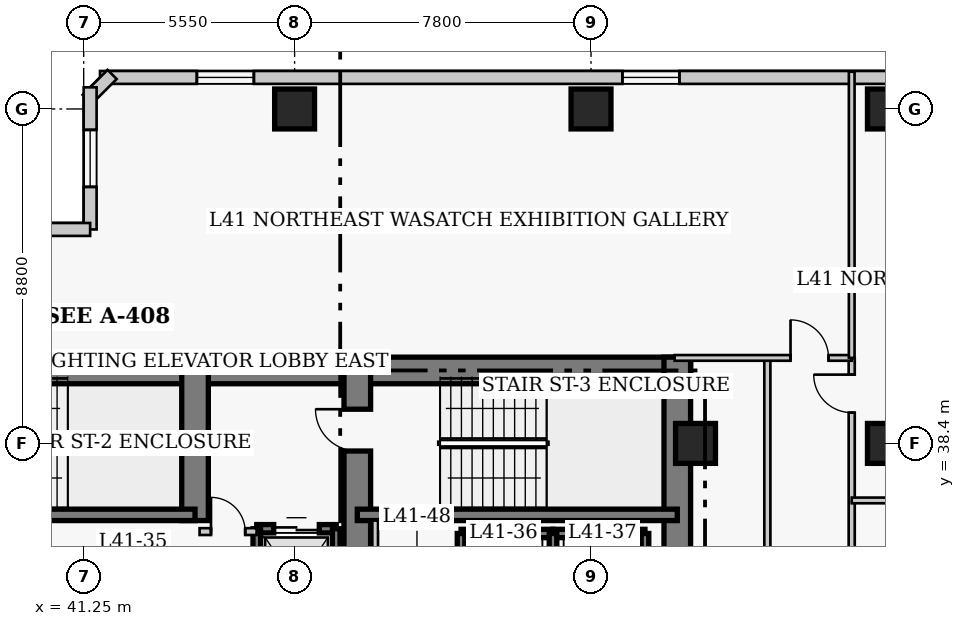
"""IFC4 building model, lengths in metres.
Left out: names, types, materials, properties, quantities, classifications, styles, units other than length and angle.
Written with IfcOpenShell. Run it as: python <this file> out.ifc"""

import sys

from ifc_helpers import new_model, si_unit, direction, frame, frame_2d, origin, origin_2d, place, context, subcontext, project, spatial, rectangle, extrude, element, fill, save


model = new_model("IFC4")
c1 = context("Model", 3, precision=1e-05, world=origin(), true_north=direction((0.0, 1.0)))
c2 = subcontext(c1, "Body", "Model", "MODEL_VIEW")
j1 = project(units=[si_unit("LENGTHUNIT", "METRE"), si_unit("PLANEANGLEUNIT", "RADIAN")], contexts=[c1])
p1 = place(None, origin())
s1 = spatial("IfcSite", under=j1, at=p1, CompositionType="ELEMENT")
p2 = place(p1, origin())
s2 = spatial("IfcBuilding", under=s1, at=p2, CompositionType="ELEMENT")
p3 = place(p2, frame((0.0, 0.0, 165.0)))
s3 = spatial("IfcBuildingStorey", under=s2, at=p3, CompositionType="ELEMENT", Elevation=165.0)
p4 = place(p3, frame((35.85, 40.32, 0.0), z_axis=(0.0, 0.0, 1.0), x_axis=(1.0, 0.0, 0.0)))
e1 = element("IfcWall", 1, at=p4, inside=s3, PredefinedType="SHEAR", context=c2, shape_type="SweptSolid", body=[
    extrude(rectangle(XDim=12.6, YDim=0.7, at=frame_2d((6.3, 0.0))), origin(), (0.0, 0.0, 1.0), 3.8),
])
p5 = place(p3, frame((48.45, 40.32, 0.0), z_axis=(0.0, 0.0, 1.0), x_axis=(1.0, 0.0, 0.0)))
e2 = element("IfcWall", 2, at=p5, inside=s3, PredefinedType="SHEAR", context=c2, shape_type="SweptSolid", body=[
    extrude(rectangle(XDim=8.77, YDim=0.7, at=frame_2d((4.385, 0.0))), origin(), (0.0, 0.0, 1.0), 3.8),
])
p6 = place(p3, frame((56.87, 27.05, 0.0), z_axis=(0.0, 0.0, 1.0), x_axis=(0.0, 1.0, 0.0)))
e3 = element("IfcWall", 3, at=p6, inside=s3, PredefinedType="SHEAR", context=c2, shape_type="SweptSolid", body=[
    extrude(rectangle(XDim=13.62, YDim=0.7, at=frame_2d((6.81, 0.0))), origin(), (0.0, 0.0, 1.0), 3.8),
])
p7 = place(p3, frame((44.18, 36.37, 0.0), z_axis=(0.0, 0.0, 1.0), x_axis=(0.0, 1.0, 0.0)))
e4 = element("IfcWall", 4, at=p7, inside=s3, PredefinedType="SHEAR", context=c2, shape_type="SweptSolid", body=[
    extrude(rectangle(XDim=3.95, YDim=0.7, at=frame_2d((1.975, 0.0))), origin(), (0.0, 0.0, 1.0), 3.8),
])
p8 = place(p3, frame((48.45, 32.4, 0.0), z_axis=(0.0, 0.0, 1.0), x_axis=(0.0, 1.0, 0.0)))
e5 = element("IfcWall", 5, at=p8, inside=s3, PredefinedType="SHEAR", context=c2, shape_type="SweptSolid", body=[
    extrude(rectangle(XDim=7.92, YDim=0.7, at=frame_2d((3.96, 0.0))), origin(), (0.0, 0.0, 1.0), 3.8),
])
p9 = place(p8, frame((5.8, 0.0, 0.0)))
e6 = element("IfcOpeningElement", 6, at=p9, cuts=e5, PredefinedType="OPENING", context=c2, shape_type="SweptSolid", body=[
    extrude(rectangle(XDim=1.1, YDim=2.15, at=frame_2d((0.55, 1.075))), frame((0.0, 0.36, 0.0), z_axis=(0.0, -1.0, 0.0), x_axis=(1.0, 0.0, 0.0)), (0.0, 0.0, 1.0), 0.72),
])
p10 = place(p3, frame((35.85, 36.52, 0.0), z_axis=(0.0, 0.0, 1.0), x_axis=(1.0, 0.0, 0.0)))
e7 = element("IfcWall", 7, at=p10, inside=s3, PredefinedType="SHEAR", context=c2, shape_type="SweptSolid", body=[
    extrude(rectangle(XDim=8.33, YDim=0.3, at=frame_2d((4.165, 0.0))), origin(), (0.0, 0.0, 1.0), 3.8),
])
p11 = place(p3, frame((48.45, 36.52, 0.0), z_axis=(0.0, 0.0, 1.0), x_axis=(1.0, 0.0, 0.0)))
e8 = element("IfcWall", 8, at=p11, inside=s3, PredefinedType="SHEAR", context=c2, shape_type="SweptSolid", body=[
    extrude(rectangle(XDim=8.42, YDim=0.3, at=frame_2d((4.21, 0.0))), origin(), (0.0, 0.0, 1.0), 3.8),
])
for number, where, z_axis, x_axis in (
    (9, (46.8, 47.2, 0.0), (0.0, 0.0, 1.0), (1.0, 0.0, 0.0)),
    (10, (54.6, 47.2, 0.0), (0.0, 0.0, 1.0), (1.0, 0.0, 0.0)),
    (11, (62.4, 38.4, 0.0), (0.0, 0.0, 1.0), (1.0, 0.0, 0.0)),
    (12, (62.4, 47.2, 0.0), (0.0, 0.0, 1.0), (1.0, 0.0, 0.0)),
    (13, (57.35, 38.4, 0.0), (0.0, 0.0, 1.0), (1.0, 0.0, 0.0)),
):
    element("IfcColumn", number, at=place(p3, frame(where, z_axis=z_axis, x_axis=x_axis)), inside=s3, PredefinedType="COLUMN", context=c2, shape_type="SweptSolid", body=[
        extrude(rectangle(XDim=1.05, YDim=1.05, at=origin_2d()), origin(), (0.0, 0.0, 1.0), 3.8),
    ])
p12 = place(p3, frame((68.37, 48.03, 0.0), z_axis=(0.0, 0.0, 1.0), x_axis=(-1.0, 0.0, 0.0)))
e14 = element("IfcWall", 14, at=p12, inside=s3, PredefinedType="SOLIDWALL", context=c2, shape_type="SweptSolid", body=[
    extrude(rectangle(XDim=26.69, YDim=0.34, at=frame_2d((13.345, 0.0))), origin(), (0.0, 0.0, 1.0), 3.55),
])
p13 = place(p12, frame((3.048, 0.0, 0.85)))
e15 = element("IfcOpeningElement", 15, at=p13, cuts=e14, PredefinedType="OPENING", context=c2, shape_type="SweptSolid", body=[
    extrude(rectangle(XDim=1.5, YDim=1.75, at=frame_2d((0.75, 0.875))), frame((0.0, 0.18, 0.0), z_axis=(0.0, -1.0, 0.0), x_axis=(1.0, 0.0, 0.0)), (0.0, 0.0, 1.0), 0.36),
])
p14 = place(p12, frame((11.445, 0.0, 0.85)))
e16 = element("IfcOpeningElement", 16, at=p14, cuts=e14, PredefinedType="OPENING", context=c2, shape_type="SweptSolid", body=[
    extrude(rectangle(XDim=1.5, YDim=1.75, at=frame_2d((0.75, 0.875))), frame((0.0, 0.18, 0.0), z_axis=(0.0, -1.0, 0.0), x_axis=(1.0, 0.0, 0.0)), (0.0, 0.0, 1.0), 0.36),
])
p15 = place(p12, frame((22.642, 0.0, 0.85)))
e17 = element("IfcOpeningElement", 17, at=p15, cuts=e14, PredefinedType="OPENING", context=c2, shape_type="SweptSolid", body=[
    extrude(rectangle(XDim=1.5, YDim=1.75, at=frame_2d((0.75, 0.875))), frame((0.0, 0.18, 0.0), z_axis=(0.0, -1.0, 0.0), x_axis=(1.0, 0.0, 0.0)), (0.0, 0.0, 1.0), 0.36),
])
p16 = place(p3, frame((41.999, 48.108, 0.0), z_axis=(0.0, 0.0, 1.0), x_axis=(-0.707106781187, -0.707106781187, 0.0)))
e18 = element("IfcWall", 18, at=p16, inside=s3, PredefinedType="SOLIDWALL", context=c2, shape_type="SweptSolid", body=[
    extrude(rectangle(XDim=0.929, YDim=0.34, at=frame_2d((0.464, 0.0))), origin(), (0.0, 0.0, 1.0), 3.55),
])
p17 = place(p3, frame((41.42, 47.77, 0.0), z_axis=(0.0, 0.0, 1.0), x_axis=(0.0, -1.0, 0.0)))
e19 = element("IfcWall", 19, at=p17, inside=s3, PredefinedType="SOLIDWALL", context=c2, shape_type="SweptSolid", body=[
    extrude(rectangle(XDim=3.74, YDim=0.34, at=frame_2d((1.87, 0.0))), origin(), (0.0, 0.0, 1.0), 3.55),
])
p18 = place(p17, frame((1.12, 0.0, 0.85)))
e20 = element("IfcOpeningElement", 20, at=p18, cuts=e19, PredefinedType="OPENING", context=c2, shape_type="SweptSolid", body=[
    extrude(rectangle(XDim=1.5, YDim=1.75, at=frame_2d((0.75, 0.875))), frame((0.0, 0.18, 0.0), z_axis=(0.0, -1.0, 0.0), x_axis=(1.0, 0.0, 0.0)), (0.0, 0.0, 1.0), 0.36),
])
p19 = place(p3, frame((41.42, 44.03, 0.0), z_axis=(0.0, 0.0, 1.0), x_axis=(-1.0, 0.0, 0.0)))
e21 = element("IfcWall", 21, at=p19, inside=s3, PredefinedType="SOLIDWALL", context=c2, shape_type="SweptSolid", body=[
    extrude(rectangle(XDim=4.84, YDim=0.34, at=frame_2d((2.42, 0.0))), origin(), (0.0, 0.0, 1.0), 3.55),
])
p20 = place(p19, frame((1.67, 0.0, 0.85)))
e22 = element("IfcOpeningElement", 22, at=p20, cuts=e21, PredefinedType="OPENING", context=c2, shape_type="SweptSolid", body=[
    extrude(rectangle(XDim=1.5, YDim=1.75, at=frame_2d((0.75, 0.875))), frame((0.0, 0.18, 0.0), z_axis=(0.0, -1.0, 0.0), x_axis=(1.0, 0.0, 0.0)), (0.0, 0.0, 1.0), 0.36),
])
p21 = place(p3, frame((51.18, 36.03, 0.0), z_axis=(0.0, 0.0, 1.0), x_axis=(1.0, 0.0, 0.0)))
e23 = element("IfcWall", 23, at=p21, inside=s3, PredefinedType="SHEAR", context=c2, shape_type="SweptSolid", body=[
    extrude(rectangle(XDim=2.42, YDim=0.22, at=frame_2d((1.21, 0.0))), origin(), (0.0, 0.0, 1.0), 3.8),
])
p22 = place(p3, frame((51.18, 33.17, 0.0), z_axis=(0.0, 0.0, 1.0), x_axis=(0.0, 1.0, 0.0)))
e24 = element("IfcWall", 24, at=p22, inside=s3, PredefinedType="SHEAR", context=c2, shape_type="SweptSolid", body=[
    extrude(rectangle(XDim=2.86, YDim=0.2, at=frame_2d((1.43, 0.0))), origin(), (0.0, 0.0, 1.0), 3.8),
])
p23 = place(p3, frame((53.6, 36.03, 0.0), z_axis=(0.0, 0.0, 1.0), x_axis=(1.0, 0.0, 0.0)))
e25 = element("IfcWall", 25, at=p23, inside=s3, PredefinedType="SHEAR", context=c2, shape_type="SweptSolid", body=[
    extrude(rectangle(XDim=2.42, YDim=0.22, at=frame_2d((1.21, 0.0))), origin(), (0.0, 0.0, 1.0), 3.8),
])
for number, where, z_axis, x_axis in (
    (26, (53.6, 33.17, 0.0), (0.0, 0.0, 1.0), (0.0, 1.0, 0.0)),
    (27, (56.02, 33.17, 0.0), (0.0, 0.0, 1.0), (0.0, 1.0, 0.0)),
):
    element("IfcWall", number, at=place(p3, frame(where, z_axis=z_axis, x_axis=x_axis)), inside=s3, PredefinedType="SHEAR", context=c2, shape_type="SweptSolid", body=[
        extrude(rectangle(XDim=2.86, YDim=0.2, at=frame_2d((1.43, 0.0))), origin(), (0.0, 0.0, 1.0), 3.8),
    ])
p24 = place(p3, frame((45.805, 36.155, 0.0), z_axis=(0.0, 0.0, 1.0), x_axis=(1.0, 0.0, 0.0)))
e28 = element("IfcWall", 28, at=p24, inside=s3, PredefinedType="SHEAR", context=c2, shape_type="SweptSolid", body=[
    extrude(rectangle(XDim=2.09, YDim=0.22, at=frame_2d((1.045, 0.0))), origin(), (0.0, 0.0, 1.0), 3.8),
])
p25 = place(p24, frame((0.445, 0.0, 0.0)))
e29 = element("IfcOpeningElement", 29, at=p25, cuts=e28, PredefinedType="OPENING", context=c2, shape_type="SweptSolid", body=[
    extrude(rectangle(XDim=1.2, YDim=2.15, at=frame_2d((0.6, 1.075))), frame((0.0, 0.12, 0.0), z_axis=(0.0, -1.0, 0.0), x_axis=(1.0, 0.0, 0.0)), (0.0, 0.0, 1.0), 0.24),
])
p26 = place(p3, frame((45.805, 32.65, 0.0), z_axis=(0.0, 0.0, 1.0), x_axis=(0.0, 1.0, 0.0)))
e30 = element("IfcWall", 30, at=p26, inside=s3, PredefinedType="SHEAR", context=c2, shape_type="SweptSolid", body=[
    extrude(rectangle(XDim=3.505, YDim=0.2, at=frame_2d((1.752, 0.0))), origin(), (0.0, 0.0, 1.0), 3.8),
])
p27 = place(p3, frame((47.895, 33.245, 0.0), z_axis=(0.0, 0.0, 1.0), x_axis=(0.0, 1.0, 0.0)))
e31 = element("IfcWall", 31, at=p27, inside=s3, PredefinedType="SHEAR", context=c2, shape_type="SweptSolid", body=[
    extrude(rectangle(XDim=2.91, YDim=0.2, at=frame_2d((1.455, 0.0))), origin(), (0.0, 0.0, 1.0), 3.8),
])
p28 = place(p3, frame((44.3, 36.08, 0.0), z_axis=(0.0, 0.0, 1.0), x_axis=(1.0, 0.0, 0.0)))
e32 = element("IfcWall", 32, at=p28, inside=s3, PredefinedType="PARTITIONING", context=c2, shape_type="SweptSolid", body=[
    extrude(rectangle(XDim=1.5, YDim=0.18, at=frame_2d((0.75, 0.0))), origin(), (0.0, 0.0, 1.0), 3.55),
])
p29 = place(p28, frame((0.3, 0.0, 0.0)))
e33 = element("IfcOpeningElement", 33, at=p29, cuts=e32, PredefinedType="OPENING", context=c2, shape_type="SweptSolid", body=[
    extrude(rectangle(XDim=0.9, YDim=2.15, at=frame_2d((0.45, 1.075))), frame((0.0, 0.1, 0.0), z_axis=(0.0, -1.0, 0.0), x_axis=(1.0, 0.0, 0.0)), (0.0, 0.0, 1.0), 0.2),
])
p30 = place(p3, frame((48.92, 32.75, 0.0), z_axis=(0.0, 0.0, 1.0), x_axis=(0.0, 1.0, 0.0)))
e34 = element("IfcWall", 34, at=p30, inside=s3, PredefinedType="PARTITIONING", context=c2, shape_type="SweptSolid", body=[
    extrude(rectangle(XDim=3.62, YDim=0.15, at=frame_2d((1.81, 0.0))), origin(), (0.0, 0.0, 1.0), 3.55),
])
p31 = place(p3, frame((61.46, 12.05, 0.0), z_axis=(0.0, 0.0, 1.0), x_axis=(0.0, 1.0, 0.0)))
e35 = element("IfcWall", 35, at=p31, inside=s3, PredefinedType="PARTITIONING", context=c2, shape_type="SweptSolid", body=[
    extrude(rectangle(XDim=28.6, YDim=0.16, at=frame_2d((14.3, 0.0))), origin(), (0.0, 0.0, 1.0), 3.55),
])
p32 = place(p31, frame((0.925, 0.0, 0.0)))
e36 = element("IfcOpeningElement", 36, at=p32, cuts=e35, PredefinedType="OPENING", context=c2, shape_type="SweptSolid", body=[
    extrude(rectangle(XDim=0.95, YDim=2.1, at=frame_2d((0.475, 1.05))), frame((0.0, 0.09, 0.0), z_axis=(0.0, -1.0, 0.0), x_axis=(1.0, 0.0, 0.0)), (0.0, 0.0, 1.0), 0.18),
])
p33 = place(p31, frame((20.325, 0.0, 0.0)))
e37 = element("IfcOpeningElement", 37, at=p33, cuts=e35, PredefinedType="OPENING", context=c2, shape_type="SweptSolid", body=[
    extrude(rectangle(XDim=0.95, YDim=2.1, at=frame_2d((0.475, 1.05))), frame((0.0, 0.09, 0.0), z_axis=(0.0, -1.0, 0.0), x_axis=(1.0, 0.0, 0.0)), (0.0, 0.0, 1.0), 0.18),
])
p34 = place(p31, frame((27.16, 0.0, 0.0)))
e38 = element("IfcOpeningElement", 38, at=p34, cuts=e35, PredefinedType="OPENING", context=c2, shape_type="SweptSolid", body=[
    extrude(rectangle(XDim=1.0, YDim=2.15, at=frame_2d((0.5, 1.075))), frame((0.0, 0.09, 0.0), z_axis=(0.0, -1.0, 0.0), x_axis=(1.0, 0.0, 0.0)), (0.0, 0.0, 1.0), 0.18),
])
p35 = place(p3, frame((59.24, 17.96, 0.0), z_axis=(0.0, 0.0, 1.0), x_axis=(0.0, 1.0, 0.0)))
e39 = element("IfcWall", 39, at=p35, inside=s3, PredefinedType="PARTITIONING", context=c2, shape_type="SweptSolid", body=[
    extrude(rectangle(XDim=22.69, YDim=0.16, at=frame_2d((11.345, 0.0))), origin(), (0.0, 0.0, 1.0), 3.55),
])
p36 = place(p3, frame((56.8, 40.65, 0.0), z_axis=(0.0, 0.0, 1.0), x_axis=(1.0, 0.0, 0.0)))
e40 = element("IfcWall", 40, at=p36, inside=s3, PredefinedType="PARTITIONING", context=c2, shape_type="SweptSolid", body=[
    extrude(rectangle(XDim=4.66, YDim=0.15, at=frame_2d((2.33, 0.0))), origin(), (0.0, 0.0, 1.0), 3.55),
])
p37 = place(p36, frame((3.05, 0.0, 0.0)))
e41 = element("IfcOpeningElement", 41, at=p37, cuts=e40, PredefinedType="OPENING", context=c2, shape_type="SweptSolid", body=[
    extrude(rectangle(XDim=1.0, YDim=2.15, at=frame_2d((0.5, 1.075))), frame((0.0, 0.085, 0.0), z_axis=(0.0, -1.0, 0.0), x_axis=(1.0, 0.0, 0.0)), (0.0, 0.0, 1.0), 0.17),
])
p38 = place(p3, frame((61.46, 40.65, 0.0), z_axis=(0.0, 0.0, 1.0), x_axis=(0.0, 1.0, 0.0)))
e42 = element("IfcWall", 42, at=p38, inside=s3, PredefinedType="PARTITIONING", context=c2, shape_type="SweptSolid", body=[
    extrude(rectangle(XDim=7.53, YDim=0.15, at=frame_2d((3.765, 0.0))), origin(), (0.0, 0.0, 1.0), 3.55),
])
p39 = place(p3, frame((61.46, 36.9, 0.0), z_axis=(0.0, 0.0, 1.0), x_axis=(1.0, 0.0, 0.0)))
e43 = element("IfcWall", 43, at=p39, inside=s3, PredefinedType="PARTITIONING", context=c2, shape_type="SweptSolid", body=[
    extrude(rectangle(XDim=3.64, YDim=0.15, at=frame_2d((1.82, 0.0))), origin(), (0.0, 0.0, 1.0), 3.55),
])
p40 = place(p14, origin())
e44 = element("IfcWindow", 44, at=p40, inside=s3, PartitioningType="SINGLE_PANEL", PredefinedType="WINDOW", context=c2, shape_type="SweptSolid", body=[
    extrude(rectangle(XDim=1.5, YDim=1.75, at=frame_2d((0.75, 0.875))), frame((0.0, 0.03, 0.0), z_axis=(0.0, -1.0, 0.0), x_axis=(1.0, 0.0, 0.0)), (0.0, 0.0, 1.0), 0.06),
])
fill(e16, e44)
p41 = place(p15, origin())
e45 = element("IfcWindow", 45, at=p41, inside=s3, PartitioningType="SINGLE_PANEL", PredefinedType="WINDOW", context=c2, shape_type="SweptSolid", body=[
    extrude(rectangle(XDim=1.5, YDim=1.75, at=frame_2d((0.75, 0.875))), frame((0.0, 0.03, 0.0), z_axis=(0.0, -1.0, 0.0), x_axis=(1.0, 0.0, 0.0)), (0.0, 0.0, 1.0), 0.06),
])
fill(e17, e45)
p42 = place(p18, origin())
e46 = element("IfcWindow", 46, at=p42, inside=s3, PartitioningType="SINGLE_PANEL", PredefinedType="WINDOW", context=c2, shape_type="SweptSolid", body=[
    extrude(rectangle(XDim=1.5, YDim=1.75, at=frame_2d((0.75, 0.875))), frame((0.0, 0.03, 0.0), z_axis=(0.0, -1.0, 0.0), x_axis=(1.0, 0.0, 0.0)), (0.0, 0.0, 1.0), 0.06),
])
fill(e20, e46)
p43 = place(p25, origin())
e47 = element("IfcDoor", 47, at=p43, inside=s3, OperationType="DOUBLE_DOOR_SLIDING", PredefinedType="DOOR", context=c2, shape_type="SweptSolid", body=[
    extrude(rectangle(XDim=1.2, YDim=2.15, at=frame_2d((0.6, 1.075))), frame((0.0, 0.025, 0.0), z_axis=(0.0, -1.0, 0.0), x_axis=(1.0, 0.0, 0.0)), (0.0, 0.0, 1.0), 0.05),
])
fill(e29, e47)
p44 = place(p29, origin())
e48 = element("IfcDoor", 48, at=p44, inside=s3, OperationType="SINGLE_SWING_LEFT", PredefinedType="DOOR", context=c2, shape_type="SweptSolid", body=[
    extrude(rectangle(XDim=0.9, YDim=2.15, at=frame_2d((0.45, 1.075))), frame((0.0, 0.025, 0.0), z_axis=(0.0, -1.0, 0.0), x_axis=(1.0, 0.0, 0.0)), (0.0, 0.0, 1.0), 0.05),
])
fill(e33, e48)
p45 = place(p37, origin())
e49 = element("IfcDoor", 49, at=p45, inside=s3, OperationType="SINGLE_SWING_LEFT", PredefinedType="DOOR", context=c2, shape_type="SweptSolid", body=[
    extrude(rectangle(XDim=1.0, YDim=2.15, at=frame_2d((0.5, 1.075))), frame((0.0, 0.025, 0.0), z_axis=(0.0, -1.0, 0.0), x_axis=(1.0, 0.0, 0.0)), (0.0, 0.0, 1.0), 0.05),
])
fill(e41, e49)
p46 = place(p34, origin())
e50 = element("IfcDoor", 50, at=p46, inside=s3, OperationType="SINGLE_SWING_RIGHT", PredefinedType="DOOR", context=c2, shape_type="SweptSolid", body=[
    extrude(rectangle(XDim=1.0, YDim=2.15, at=frame_2d((0.5, 1.075))), frame((0.0, 0.025, 0.0), z_axis=(0.0, -1.0, 0.0), x_axis=(1.0, 0.0, 0.0)), (0.0, 0.0, 1.0), 0.05),
])
fill(e38, e50)
p47 = place(p9, origin())
e51 = element("IfcDoor", 51, at=p47, inside=s3, OperationType="SINGLE_SWING_RIGHT", PredefinedType="DOOR", context=c2, shape_type="SweptSolid", body=[
    extrude(rectangle(XDim=1.1, YDim=2.15, at=frame_2d((0.55, 1.075))), frame((0.0, 0.025, 0.0), z_axis=(0.0, -1.0, 0.0), x_axis=(1.0, 0.0, 0.0)), (0.0, 0.0, 1.0), 0.05),
])
fill(e6, e51)
save(model, sys.argv[1])
